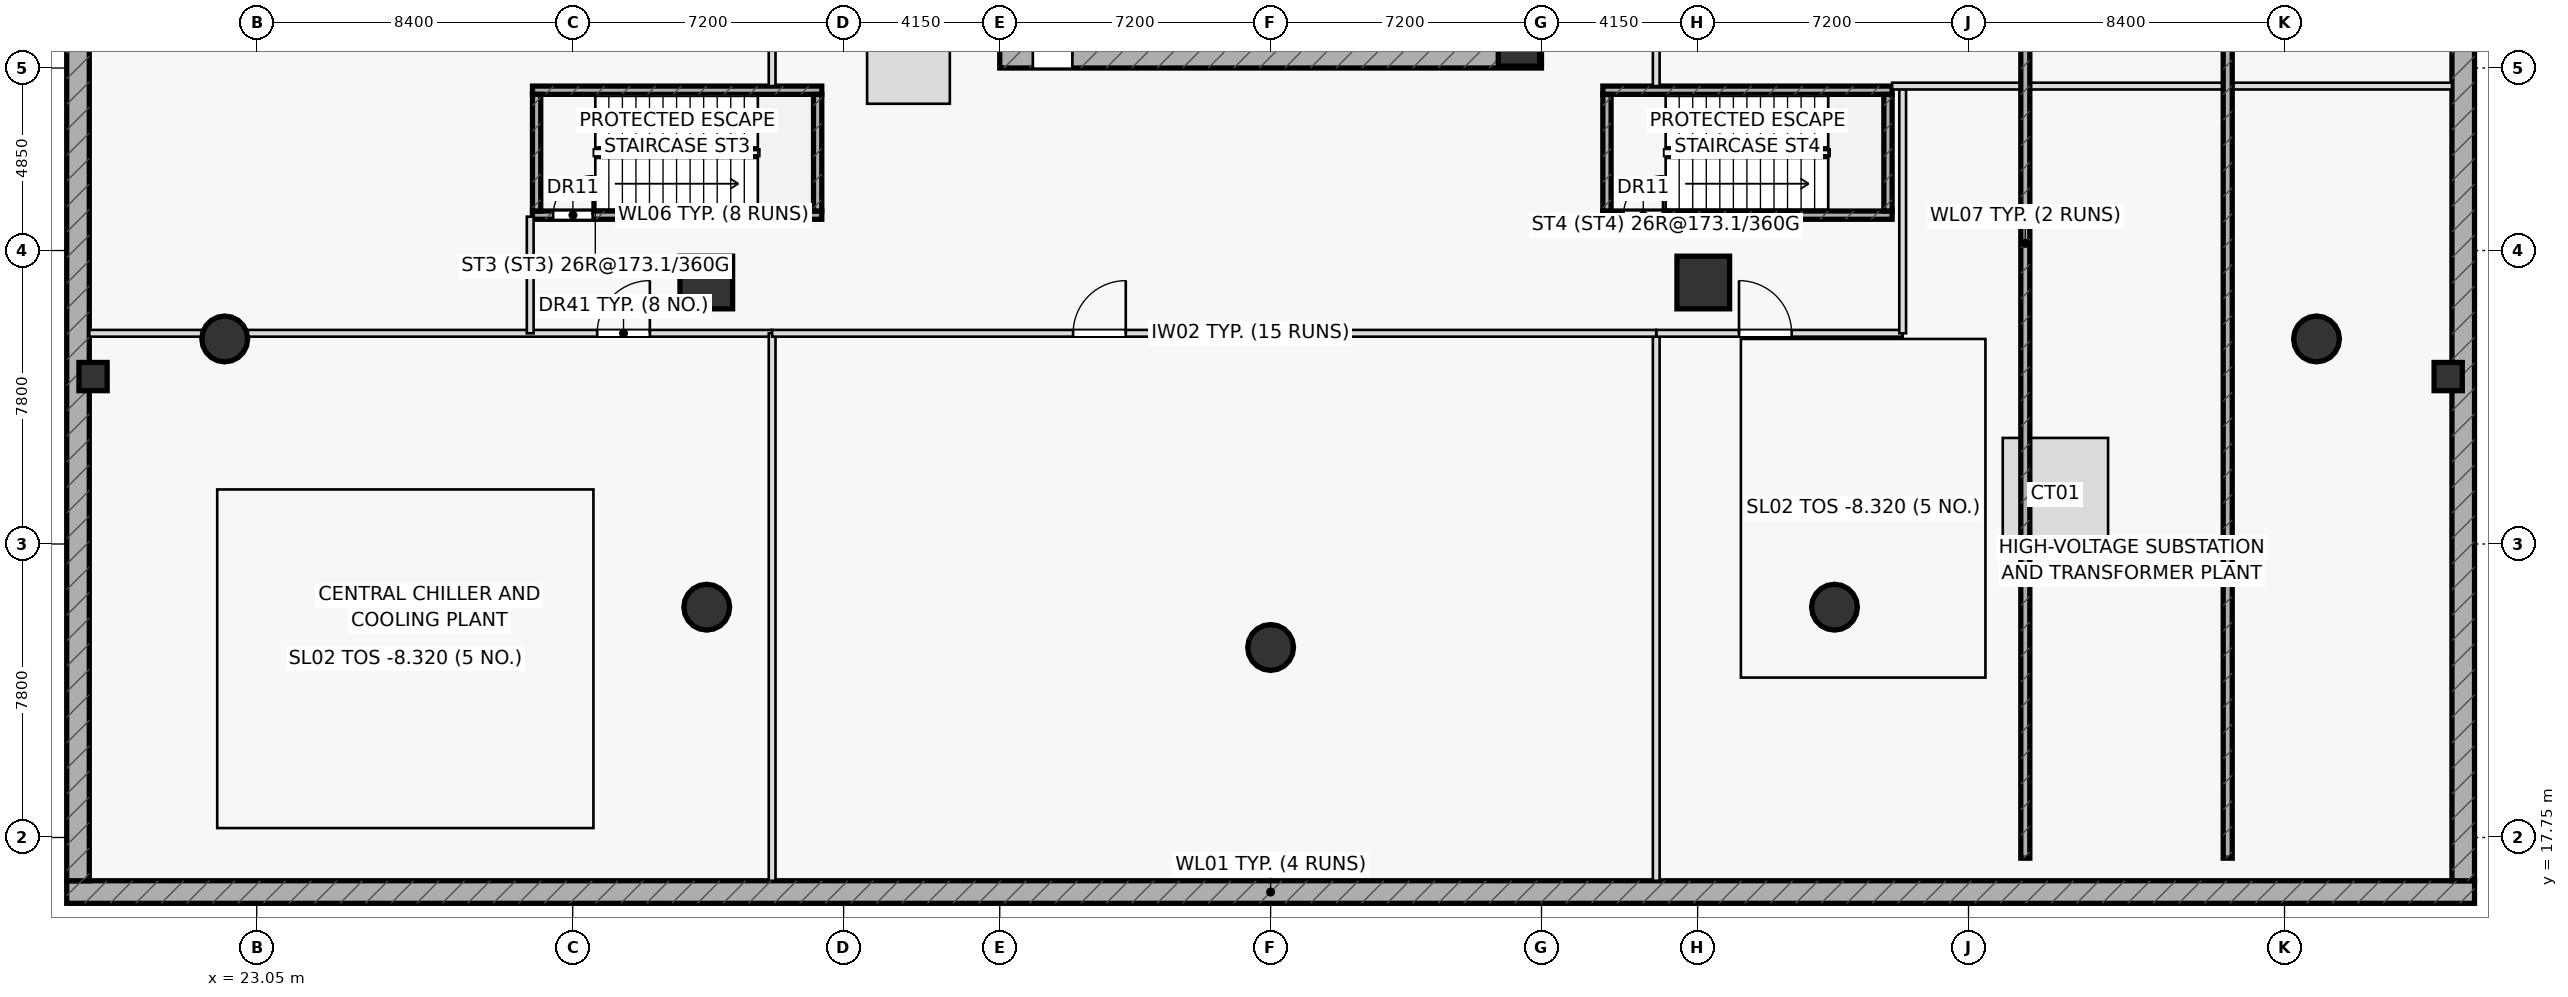
"""IFC4 building model, lengths in metres.
Left out: names, types, materials, properties, quantities, classifications, styles, units other than length and angle.
Written with IfcOpenShell. Run it as: python <this file> out.ifc"""

import sys

from ifc_helpers import new_model, si_unit, direction, frame, frame_2d, origin, origin_2d, place, context, subcontext, project, spatial, rectangle, hollow_circle, extrude, element, fill, save


model = new_model("IFC4")
c1 = context("Model", 3, precision=1e-05, world=origin(), true_north=direction((0.0, 1.0)))
c2 = subcontext(c1, "Body", "Model", "MODEL_VIEW")
j1 = project(units=[si_unit("LENGTHUNIT", "METRE"), si_unit("PLANEANGLEUNIT", "RADIAN")], contexts=[c1])
p1 = place(None, origin())
s1 = spatial("IfcSite", under=j1, at=p1, CompositionType="ELEMENT")
p2 = place(p1, origin())
s2 = spatial("IfcBuilding", under=s1, at=p2, CompositionType="ELEMENT")
p3 = place(p2, frame((0.0, 0.0, -8.7)))
s3 = spatial("IfcBuildingStorey", under=s2, at=p3, CompositionType="ELEMENT", Elevation=-8.7)
p4 = place(p3, frame((30.38, 34.29, 0.0), z_axis=(0.0, 0.0, 1.0), x_axis=(1.0, 0.0, 0.0)))
e1 = element("IfcWall", 1, at=p4, inside=s3, PredefinedType="SHEAR", context=c2, shape_type="SweptSolid", body=[
    extrude(rectangle(XDim=7.69, YDim=0.22, at=frame_2d((3.845, 0.0))), origin(), (0.0, 0.0, 1.0), 4.15),
])
p5 = place(p4, frame((0.55, 0.0, 0.0)))
e2 = element("IfcOpeningElement", 2, at=p5, cuts=e1, PredefinedType="OPENING", context=c2, shape_type="SweptSolid", body=[
    extrude(rectangle(XDim=1.05, YDim=2.2, at=frame_2d((0.525, 1.1))), frame((0.0, 0.12, 0.0), z_axis=(0.0, -1.0, 0.0), x_axis=(1.0, 0.0, 0.0)), (0.0, 0.0, 1.0), 0.24),
])
p6 = place(p3, frame((30.38, 37.61, 0.0), z_axis=(0.0, 0.0, 1.0), x_axis=(1.0, 0.0, 0.0)))
e3 = element("IfcWall", 3, at=p6, inside=s3, PredefinedType="SHEAR", context=c2, shape_type="SweptSolid", body=[
    extrude(rectangle(XDim=7.69, YDim=0.22, at=frame_2d((3.845, 0.0))), origin(), (0.0, 0.0, 1.0), 4.15),
])
for number, where, z_axis, x_axis in (
    (4, (37.96, 34.4, 0.0), (0.0, 0.0, 1.0), (0.0, 1.0, 0.0)),
    (5, (30.49, 34.4, 0.0), (0.0, 0.0, 1.0), (0.0, 1.0, 0.0)),
):
    element("IfcWall", number, at=place(p3, frame(where, z_axis=z_axis, x_axis=x_axis)), inside=s3, PredefinedType="SHEAR", context=c2, shape_type="SweptSolid", body=[
        extrude(rectangle(XDim=3.1, YDim=0.22, at=frame_2d((1.55, 0.0))), origin(), (0.0, 0.0, 1.0), 4.15),
    ])
p7 = place(p3, frame((58.83, 34.29, 0.0), z_axis=(0.0, 0.0, 1.0), x_axis=(1.0, 0.0, 0.0)))
e6 = element("IfcWall", 6, at=p7, inside=s3, PredefinedType="SHEAR", context=c2, shape_type="SweptSolid", body=[
    extrude(rectangle(XDim=7.69, YDim=0.22, at=frame_2d((3.845, 0.0))), origin(), (0.0, 0.0, 1.0), 4.15),
])
p8 = place(p7, frame((0.55, 0.0, 0.0)))
e7 = element("IfcOpeningElement", 7, at=p8, cuts=e6, PredefinedType="OPENING", context=c2, shape_type="SweptSolid", body=[
    extrude(rectangle(XDim=1.05, YDim=2.2, at=frame_2d((0.525, 1.1))), frame((0.0, 0.12, 0.0), z_axis=(0.0, -1.0, 0.0), x_axis=(1.0, 0.0, 0.0)), (0.0, 0.0, 1.0), 0.24),
])
p9 = place(p3, frame((58.83, 37.61, 0.0), z_axis=(0.0, 0.0, 1.0), x_axis=(1.0, 0.0, 0.0)))
e8 = element("IfcWall", 8, at=p9, inside=s3, PredefinedType="SHEAR", context=c2, shape_type="SweptSolid", body=[
    extrude(rectangle(XDim=7.69, YDim=0.22, at=frame_2d((3.845, 0.0))), origin(), (0.0, 0.0, 1.0), 4.15),
])
for number, where, z_axis, x_axis in (
    (9, (66.41, 34.4, 0.0), (0.0, 0.0, 1.0), (0.0, 1.0, 0.0)),
    (10, (58.94, 34.4, 0.0), (0.0, 0.0, 1.0), (0.0, 1.0, 0.0)),
):
    element("IfcWall", number, at=place(p3, frame(where, z_axis=z_axis, x_axis=x_axis)), inside=s3, PredefinedType="SHEAR", context=c2, shape_type="SweptSolid", body=[
        extrude(rectangle(XDim=3.1, YDim=0.22, at=frame_2d((1.55, 0.0))), origin(), (0.0, 0.0, 1.0), 4.15),
    ])
p10 = place(p3, frame((42.8, 38.5, 0.0), z_axis=(0.0, 0.0, 1.0), x_axis=(1.0, 0.0, 0.0)))
e11 = element("IfcWall", 11, at=p10, inside=s3, PredefinedType="SHEAR", context=c2, shape_type="SweptSolid", body=[
    extrude(rectangle(XDim=14.4, YDim=0.6, at=frame_2d((7.2, 0.0))), origin(), (0.0, 0.0, 1.0), 4.15),
])
p11 = place(p10, frame((0.88, 0.0, 0.0)))
e12 = element("IfcOpeningElement", 12, at=p11, cuts=e11, PredefinedType="OPENING", context=c2, shape_type="SweptSolid", body=[
    extrude(rectangle(XDim=1.05, YDim=2.2, at=frame_2d((0.525, 1.1))), frame((0.0, 0.31, 0.0), z_axis=(0.0, -1.0, 0.0), x_axis=(1.0, 0.0, 0.0)), (0.0, 0.0, 1.0), 0.62),
])
p12 = place(p3, frame((56.6, 38.8, 0.0), z_axis=(0.0, 0.0, 1.0), x_axis=(1.0, 0.0, 0.0)))
e13 = element("IfcColumn", 13, at=p12, inside=s3, PredefinedType="COLUMN", context=c2, shape_type="SweptSolid", body=[
    extrude(rectangle(XDim=1.1, YDim=1.1, at=origin_2d()), origin(), (0.0, 0.0, 1.0), 4.15),
])
p13 = place(p3, frame((18.0, 16.3, 0.0), z_axis=(0.0, 0.0, 1.0), x_axis=(1.0, 0.0, 0.0)))
e14 = element("IfcWall", 14, at=p13, inside=s3, PredefinedType="USERDEFINED", context=c2, shape_type="SweptSolid", body=[
    extrude(rectangle(XDim=64.0, YDim=0.6, at=frame_2d((32.0, 0.0))), origin(), (0.0, 0.0, 1.0), 4.15),
])
for number, where, z_axis, x_axis in (
    (15, (18.3, 16.6, 0.0), (0.0, 0.0, 1.0), (0.0, 1.0, 0.0)),
    (16, (81.7, 16.6, 0.0), (0.0, 0.0, 1.0), (0.0, 1.0, 0.0)),
):
    element("IfcWall", number, at=place(p3, frame(where, z_axis=z_axis, x_axis=x_axis)), inside=s3, PredefinedType="USERDEFINED", context=c2, shape_type="SweptSolid", body=[
        extrude(rectangle(XDim=56.8, YDim=0.6, at=frame_2d((28.4, 0.0))), origin(), (0.0, 0.0, 1.0), 4.15),
    ])
for number, where, z_axis, x_axis in (
    (17, (18.7, 30.0, 0.0), (0.0, 0.0, 1.0), (1.0, 0.0, 0.0)),
    (18, (81.3, 30.0, 0.0), (0.0, 0.0, 1.0), (1.0, 0.0, 0.0)),
):
    element("IfcColumn", number, at=place(p3, frame(where, z_axis=z_axis, x_axis=x_axis)), inside=s3, PredefinedType="PILASTER", context=c2, shape_type="SweptSolid", body=[
        extrude(rectangle(XDim=0.75, YDim=0.75, at=origin_2d()), origin(), (0.0, 0.0, 1.0), 4.15),
    ])
for number, where, z_axis, x_axis in (
    (19, (35.0, 32.5, 0.0), (0.0, 0.0, 1.0), (1.0, 0.0, 0.0)),
    (20, (61.5, 32.5, 0.0), (0.0, 0.0, 1.0), (1.0, 0.0, 0.0)),
):
    element("IfcColumn", number, at=place(p3, frame(where, z_axis=z_axis, x_axis=x_axis)), inside=s3, PredefinedType="COLUMN", context=c2, shape_type="SweptSolid", body=[
        extrude(rectangle(XDim=1.4, YDim=1.4, at=origin_2d()), origin(), (0.0, 0.0, 1.0), 4.15),
    ])
for number, where, z_axis, x_axis in (
    (21, (22.2, 31.0, 0.0), (0.0, 0.0, 1.0), (1.0, 0.0, 0.0)),
    (22, (35.012, 23.871, 0.0), (0.0, 0.0, 1.0), (1.0, 0.0, 0.0)),
    (23, (50.0, 22.8, 0.0), (0.0, 0.0, 1.0), (1.0, 0.0, 0.0)),
    (24, (64.988, 23.871, 0.0), (0.0, 0.0, 1.0), (1.0, 0.0, 0.0)),
    (25, (77.8, 31.0, 0.0), (0.0, 0.0, 1.0), (1.0, 0.0, 0.0)),
):
    element("IfcColumn", number, at=place(p3, frame(where, z_axis=z_axis, x_axis=x_axis)), inside=s3, PredefinedType="COLUMN", context=c2, shape_type="SweptSolid", body=[
        extrude(hollow_circle(Radius=0.61, WallThickness=0.05, at=origin_2d()), origin(), (0.0, 0.0, 1.0), 4.15),
    ])
p14 = place(p3, frame((18.6, 31.15, 0.0), z_axis=(0.0, 0.0, 1.0), x_axis=(1.0, 0.0, 0.0)))
e26 = element("IfcWall", 26, at=p14, inside=s3, PredefinedType="PARTITIONING", context=c2, shape_type="SweptSolid", body=[
    extrude(rectangle(XDim=18.15, YDim=0.18, at=frame_2d((9.075, 0.0))), origin(), (0.0, 0.0, 1.0), 3.275),
])
p15 = place(p14, frame((13.5, 0.0, 0.0)))
e27 = element("IfcOpeningElement", 27, at=p15, cuts=e26, PredefinedType="OPENING", context=c2, shape_type="SweptSolid", body=[
    extrude(rectangle(XDim=1.4, YDim=2.15, at=frame_2d((0.7, 1.075))), frame((0.0, 0.1, 0.0), z_axis=(0.0, -1.0, 0.0), x_axis=(1.0, 0.0, 0.0)), (0.0, 0.0, 1.0), 0.2),
])
p16 = place(p3, frame((36.75, 16.6, 0.0), z_axis=(0.0, 0.0, 1.0), x_axis=(0.0, 1.0, 0.0)))
e28 = element("IfcWall", 28, at=p16, inside=s3, PredefinedType="PARTITIONING", context=c2, shape_type="SweptSolid", body=[
    extrude(rectangle(XDim=14.55, YDim=0.18, at=frame_2d((7.275, 0.0))), origin(), (0.0, 0.0, 1.0), 3.175),
])
p17 = place(p3, frame((30.32, 31.15, 0.0), z_axis=(0.0, 0.0, 1.0), x_axis=(0.0, 1.0, 0.0)))
e29 = element("IfcWall", 29, at=p17, inside=s3, PredefinedType="PARTITIONING", context=c2, shape_type="SweptSolid", body=[
    extrude(rectangle(XDim=3.1, YDim=0.18, at=frame_2d((1.55, 0.0))), origin(), (0.0, 0.0, 1.0), 3.275),
])
p18 = place(p3, frame((36.75, 37.72, 0.0), z_axis=(0.0, 0.0, 1.0), x_axis=(0.0, 1.0, 0.0)))
e30 = element("IfcWall", 30, at=p18, inside=s3, PredefinedType="PARTITIONING", context=c2, shape_type="SweptSolid", body=[
    extrude(rectangle(XDim=18.38, YDim=0.18, at=frame_2d((9.19, 0.0))), origin(), (0.0, 0.0, 1.0), 3.175),
])
p19 = place(p18, frame((6.0, 0.0, 0.0)))
e31 = element("IfcOpeningElement", 31, at=p19, cuts=e30, PredefinedType="OPENING", context=c2, shape_type="SweptSolid", body=[
    extrude(rectangle(XDim=1.4, YDim=2.15, at=frame_2d((0.7, 1.075))), frame((0.0, 0.1, 0.0), z_axis=(0.0, -1.0, 0.0), x_axis=(1.0, 0.0, 0.0)), (0.0, 0.0, 1.0), 0.2),
])
p20 = place(p3, frame((60.25, 16.6, 0.0), z_axis=(0.0, 0.0, 1.0), x_axis=(0.0, 1.0, 0.0)))
e32 = element("IfcWall", 32, at=p20, inside=s3, PredefinedType="PARTITIONING", context=c2, shape_type="SweptSolid", body=[
    extrude(rectangle(XDim=14.55, YDim=0.18, at=frame_2d((7.275, 0.0))), origin(), (0.0, 0.0, 1.0), 3.175),
])
p21 = place(p3, frame((60.25, 31.15, 0.0), z_axis=(0.0, 0.0, 1.0), x_axis=(1.0, 0.0, 0.0)))
e33 = element("IfcWall", 33, at=p21, inside=s3, PredefinedType="PARTITIONING", context=c2, shape_type="SweptSolid", body=[
    extrude(rectangle(XDim=6.55, YDim=0.18, at=frame_2d((3.275, 0.0))), origin(), (0.0, 0.0, 1.0), 3.275),
])
p22 = place(p21, frame((2.2, 0.0, 0.0)))
e34 = element("IfcOpeningElement", 34, at=p22, cuts=e33, PredefinedType="OPENING", context=c2, shape_type="SweptSolid", body=[
    extrude(rectangle(XDim=1.4, YDim=2.15, at=frame_2d((0.7, 1.075))), frame((0.0, 0.1, 0.0), z_axis=(0.0, -1.0, 0.0), x_axis=(1.0, 0.0, 0.0)), (0.0, 0.0, 1.0), 0.2),
])
p23 = place(p3, frame((66.8, 31.15, 0.0), z_axis=(0.0, 0.0, 1.0), x_axis=(0.0, 1.0, 0.0)))
e35 = element("IfcWall", 35, at=p23, inside=s3, PredefinedType="PARTITIONING", context=c2, shape_type="SweptSolid", body=[
    extrude(rectangle(XDim=6.57, YDim=0.18, at=frame_2d((3.285, 0.0))), origin(), (0.0, 0.0, 1.0), 3.275),
])
p24 = place(p3, frame((66.52, 37.72, 0.0), z_axis=(0.0, 0.0, 1.0), x_axis=(1.0, 0.0, 0.0)))
e36 = element("IfcWall", 36, at=p24, inside=s3, PredefinedType="PARTITIONING", context=c2, shape_type="SweptSolid", body=[
    extrude(rectangle(XDim=14.88, YDim=0.18, at=frame_2d((7.44, 0.0))), origin(), (0.0, 0.0, 1.0), 3.175),
])
p25 = place(p3, frame((60.25, 37.72, 0.0), z_axis=(0.0, 0.0, 1.0), x_axis=(0.0, 1.0, 0.0)))
e37 = element("IfcWall", 37, at=p25, inside=s3, PredefinedType="PARTITIONING", context=c2, shape_type="SweptSolid", body=[
    extrude(rectangle(XDim=18.38, YDim=0.18, at=frame_2d((9.19, 0.0))), origin(), (0.0, 0.0, 1.0), 3.175),
])
p26 = place(p25, frame((6.0, 0.0, 0.0)))
e38 = element("IfcOpeningElement", 38, at=p26, cuts=e37, PredefinedType="OPENING", context=c2, shape_type="SweptSolid", body=[
    extrude(rectangle(XDim=1.4, YDim=2.15, at=frame_2d((0.7, 1.075))), frame((0.0, 0.1, 0.0), z_axis=(0.0, -1.0, 0.0), x_axis=(1.0, 0.0, 0.0)), (0.0, 0.0, 1.0), 0.2),
])
p27 = place(p3, frame((36.75, 31.15, 0.0), z_axis=(0.0, 0.0, 1.0), x_axis=(1.0, 0.0, 0.0)))
e39 = element("IfcWall", 39, at=p27, inside=s3, PredefinedType="PARTITIONING", context=c2, shape_type="SweptSolid", body=[
    extrude(rectangle(XDim=23.5, YDim=0.18, at=frame_2d((11.75, 0.0))), origin(), (0.0, 0.0, 1.0), 3.275),
])
p28 = place(p27, frame((8.0, 0.0, 0.0)))
e40 = element("IfcOpeningElement", 40, at=p28, cuts=e39, PredefinedType="OPENING", context=c2, shape_type="SweptSolid", body=[
    extrude(rectangle(XDim=1.4, YDim=2.15, at=frame_2d((0.7, 1.075))), frame((0.0, 0.1, 0.0), z_axis=(0.0, -1.0, 0.0), x_axis=(1.0, 0.0, 0.0)), (0.0, 0.0, 1.0), 0.2),
])
for number, where, z_axis, x_axis in (
    (41, (70.06, 17.2, 0.0), (0.0, 0.0, 1.0), (0.0, 1.0, 0.0)),
    (42, (75.44, 17.2, 0.0), (0.0, 0.0, 1.0), (0.0, 1.0, 0.0)),
):
    element("IfcWall", number, at=place(p3, frame(where, z_axis=z_axis, x_axis=x_axis)), inside=s3, PredefinedType="SHEAR", context=c2, shape_type="SweptSolid", body=[
        extrude(rectangle(XDim=32.68, YDim=0.24, at=frame_2d((16.34, 0.0))), origin(), (0.0, 0.0, 1.0), 4.15),
    ])
p29 = place(p11, origin())
e43 = element("IfcDoor", 43, at=p29, inside=s3, OperationType="SINGLE_SWING_RIGHT", PredefinedType="DOOR", context=c2, shape_type="SweptSolid", body=[
    extrude(rectangle(XDim=1.05, YDim=2.2, at=frame_2d((0.525, 1.1))), frame((0.0, 0.025, 0.0), z_axis=(0.0, -1.0, 0.0), x_axis=(1.0, 0.0, 0.0)), (0.0, 0.0, 1.0), 0.05),
])
fill(e12, e43)
p30 = place(p5, origin())
e44 = element("IfcDoor", 44, at=p30, inside=s3, OperationType="SINGLE_SWING_RIGHT", PredefinedType="DOOR", context=c2, shape_type="SweptSolid", body=[
    extrude(rectangle(XDim=1.05, YDim=2.2, at=frame_2d((0.525, 1.1))), frame((0.0, 0.025, 0.0), z_axis=(0.0, -1.0, 0.0), x_axis=(1.0, 0.0, 0.0)), (0.0, 0.0, 1.0), 0.05),
])
fill(e2, e44)
p31 = place(p8, origin())
e45 = element("IfcDoor", 45, at=p31, inside=s3, OperationType="SINGLE_SWING_RIGHT", PredefinedType="DOOR", context=c2, shape_type="SweptSolid", body=[
    extrude(rectangle(XDim=1.05, YDim=2.2, at=frame_2d((0.525, 1.1))), frame((0.0, 0.025, 0.0), z_axis=(0.0, -1.0, 0.0), x_axis=(1.0, 0.0, 0.0)), (0.0, 0.0, 1.0), 0.05),
])
fill(e7, e45)
p32 = place(p15, origin())
e46 = element("IfcDoor", 46, at=p32, inside=s3, OperationType="SINGLE_SWING_RIGHT", PredefinedType="DOOR", context=c2, shape_type="SweptSolid", body=[
    extrude(rectangle(XDim=1.4, YDim=2.15, at=frame_2d((0.7, 1.075))), frame((0.0, 0.025, 0.0), z_axis=(0.0, -1.0, 0.0), x_axis=(1.0, 0.0, 0.0)), (0.0, 0.0, 1.0), 0.05),
])
fill(e27, e46)
p33 = place(p22, origin())
e47 = element("IfcDoor", 47, at=p33, inside=s3, OperationType="SINGLE_SWING_LEFT", PredefinedType="DOOR", context=c2, shape_type="SweptSolid", body=[
    extrude(rectangle(XDim=1.4, YDim=2.15, at=frame_2d((0.7, 1.075))), frame((0.0, 0.025, 0.0), z_axis=(0.0, -1.0, 0.0), x_axis=(1.0, 0.0, 0.0)), (0.0, 0.0, 1.0), 0.05),
])
fill(e34, e47)
p34 = place(p28, origin())
e48 = element("IfcDoor", 48, at=p34, inside=s3, OperationType="SINGLE_SWING_RIGHT", PredefinedType="DOOR", context=c2, shape_type="SweptSolid", body=[
    extrude(rectangle(XDim=1.4, YDim=2.15, at=frame_2d((0.7, 1.075))), frame((0.0, 0.025, 0.0), z_axis=(0.0, -1.0, 0.0), x_axis=(1.0, 0.0, 0.0)), (0.0, 0.0, 1.0), 0.05),
])
fill(e40, e48)
save(model, sys.argv[1])
